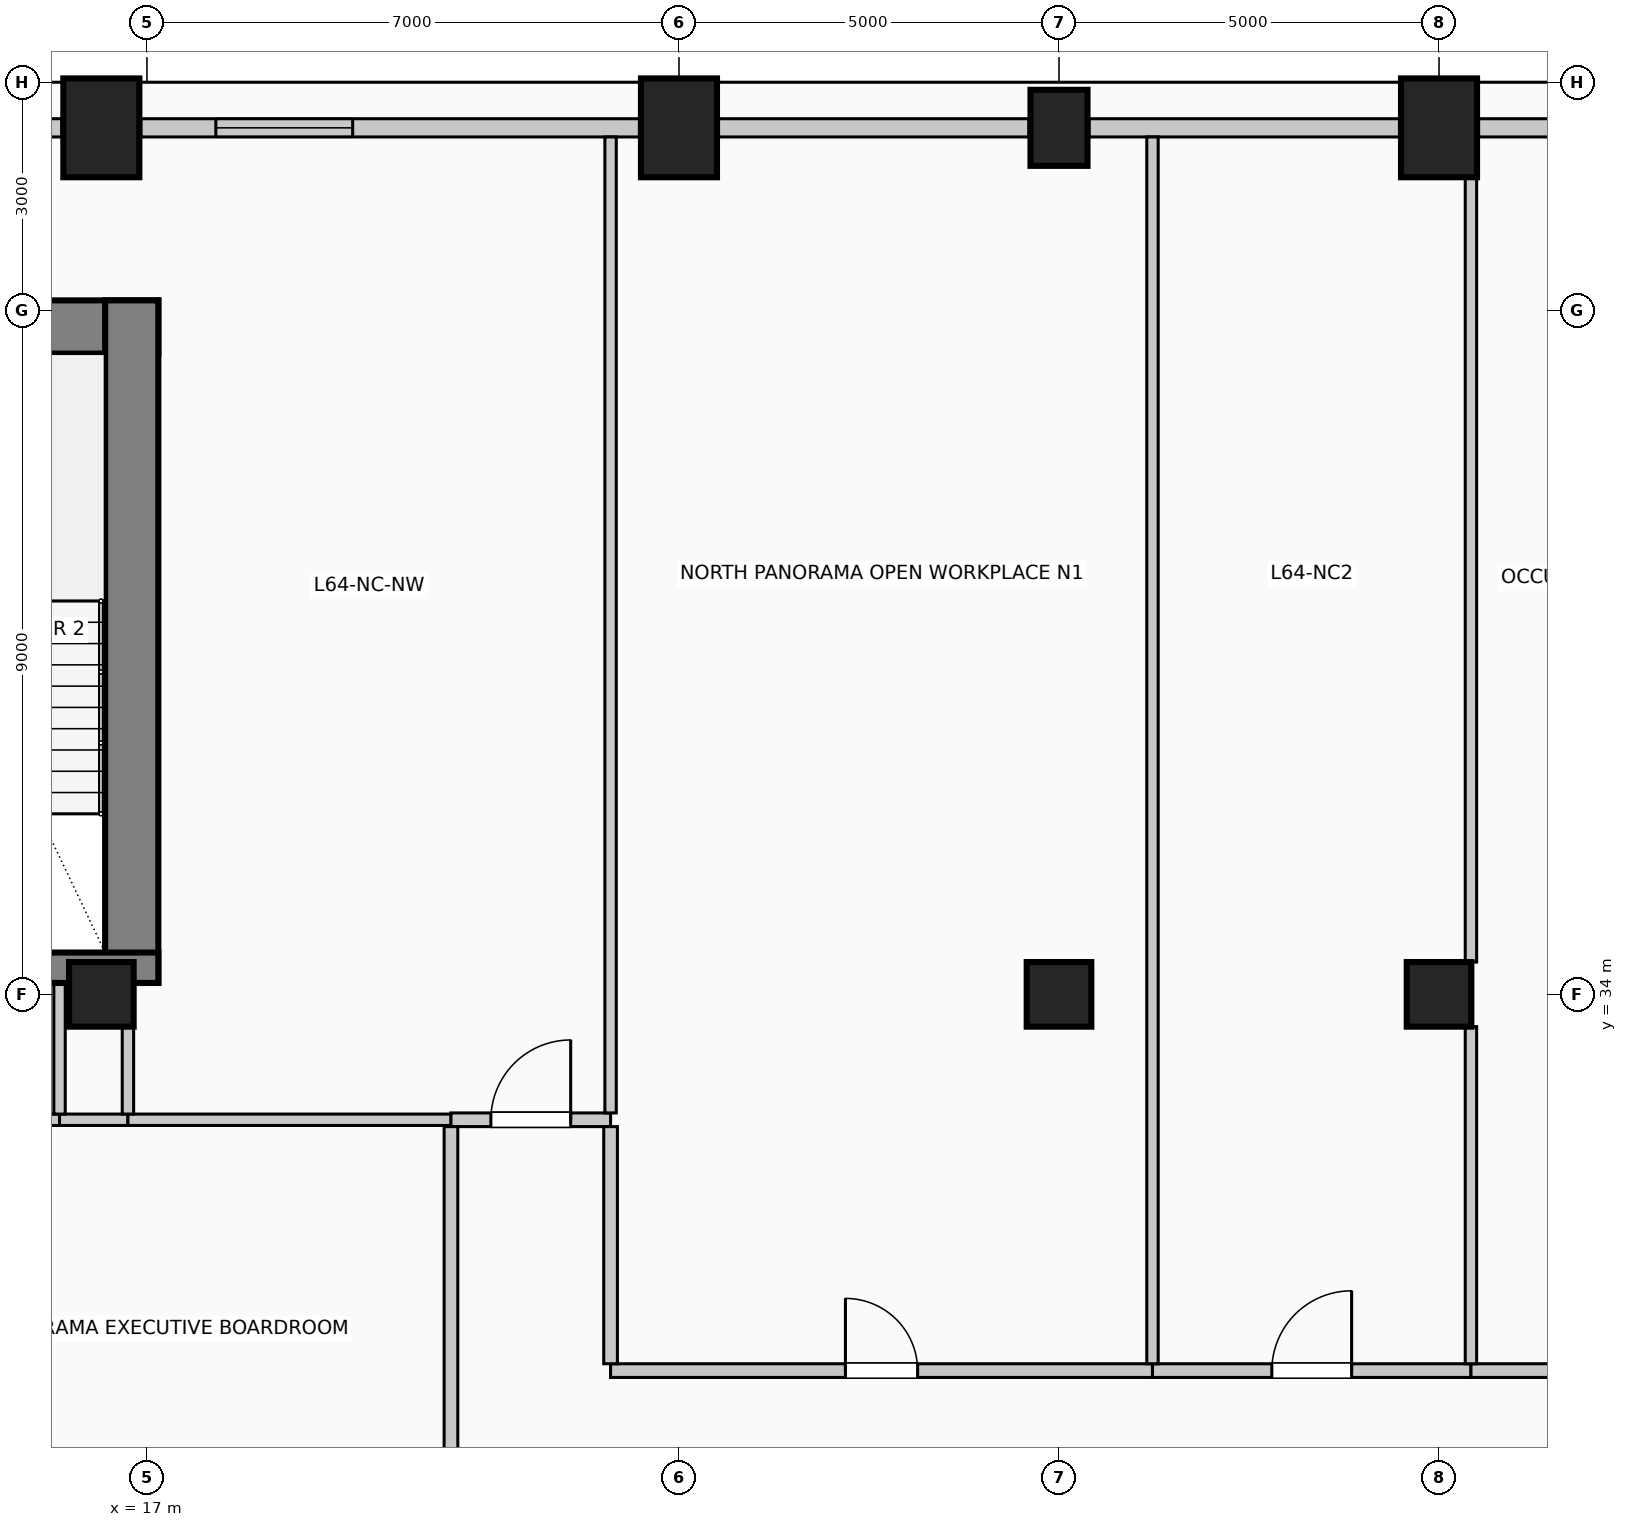
"""IFC4 building model, lengths in metres.
Left out: names, types, materials, properties, quantities, classifications, styles, units other than length and angle.
Written with IfcOpenShell. Run it as: python <this file> out.ifc"""

import sys

from ifc_helpers import new_model, si_unit, direction, frame, frame_2d, origin, origin_2d, place, context, subcontext, project, spatial, rectangle, circle, extrude, element, fill, save


model = new_model("IFC4")
c1 = context("Model", 3, precision=1e-05, world=origin(), true_north=direction((0.0, 1.0)))
c2 = subcontext(c1, "Body", "Model", "MODEL_VIEW")
j1 = project(units=[si_unit("LENGTHUNIT", "METRE"), si_unit("PLANEANGLEUNIT", "RADIAN")], contexts=[c1])
p1 = place(None, origin())
s1 = spatial("IfcSite", under=j1, at=p1, CompositionType="ELEMENT")
p2 = place(p1, origin())
s2 = spatial("IfcBuilding", under=s1, at=p2, CompositionType="ELEMENT")
p3 = place(p2, frame((0.0, 0.0, 264.6)))
s3 = spatial("IfcBuildingStorey", under=s2, at=p3, CompositionType="ELEMENT", Elevation=264.6)
p4 = place(p3, frame((2.85, 42.78, 0.0), z_axis=(0.0, 0.0, 1.0), x_axis=(1.0, 0.0, 0.0)))
e1 = element("IfcWall", 1, at=p4, inside=s3, PredefinedType="SHEAR", context=c2, shape_type="SweptSolid", body=[
    extrude(rectangle(XDim=14.3, YDim=0.7, at=frame_2d((7.15, 0.0))), origin(), (0.0, 0.0, 1.0), 4.0),
])
p5 = place(p3, frame((16.8, 34.15, 0.0), z_axis=(0.0, 0.0, 1.0), x_axis=(0.0, 1.0, 0.0)))
e2 = element("IfcWall", 2, at=p5, inside=s3, PredefinedType="SHEAR", context=c2, shape_type="SweptSolid", body=[
    extrude(rectangle(XDim=8.98, YDim=0.7, at=frame_2d((4.49, 0.0))), origin(), (0.0, 0.0, 1.0), 4.0),
])
p6 = place(p3, frame((12.29, 34.35, 0.0), z_axis=(0.0, 0.0, 1.0), x_axis=(1.0, 0.0, 0.0)))
e3 = element("IfcWall", 3, at=p6, inside=s3, PredefinedType="SHEAR", context=c2, shape_type="SweptSolid", body=[
    extrude(rectangle(XDim=4.86, YDim=0.4, at=frame_2d((2.43, 0.0))), origin(), (0.0, 0.0, 1.0), 4.0),
])
p7 = place(p6, frame((1.4, 0.0, 0.0)))
e4 = element("IfcOpeningElement", 4, at=p7, cuts=e3, PredefinedType="OPENING", context=c2, shape_type="SweptSolid", body=[
    extrude(rectangle(XDim=1.15, YDim=2.2, at=frame_2d((0.575, 1.1))), frame((0.0, 0.21, 0.0), z_axis=(0.0, -1.0, 0.0), x_axis=(1.0, 0.0, 0.0)), (0.0, 0.0, 1.0), 0.42),
])
for number, where, z_axis, x_axis in (
    (5, (16.4, 45.4, 0.0), (0.0, 0.0, 1.0), (1.0, 0.0, 0.0)),
    (6, (24.0, 45.4, 0.0), (0.0, 0.0, 1.0), (1.0, 0.0, 0.0)),
):
    element("IfcColumn", number, at=place(p3, frame(where, z_axis=z_axis, x_axis=x_axis)), inside=s3, PredefinedType="COLUMN", context=c2, shape_type="SweptSolid", body=[
        extrude(rectangle(XDim=1.0, YDim=1.3, at=origin_2d()), origin(), (0.0, 0.0, 1.0), 4.0),
    ])
p8 = place(p3, frame((29.0, 45.4, 0.0), z_axis=(0.0, 0.0, 1.0), x_axis=(1.0, 0.0, 0.0)))
e7 = element("IfcColumn", 7, at=p8, inside=s3, PredefinedType="COLUMN", context=c2, shape_type="SweptSolid", body=[
    extrude(rectangle(XDim=0.75, YDim=1.0, at=origin_2d()), origin(), (0.0, 0.0, 1.0), 4.0),
])
p9 = place(p3, frame((34.0, 45.4, 0.0), z_axis=(0.0, 0.0, 1.0), x_axis=(1.0, 0.0, 0.0)))
e8 = element("IfcColumn", 8, at=p9, inside=s3, PredefinedType="COLUMN", context=c2, shape_type="SweptSolid", body=[
    extrude(rectangle(XDim=1.0, YDim=1.3, at=origin_2d()), origin(), (0.0, 0.0, 1.0), 4.0),
])
for number, where, z_axis, x_axis in (
    (9, (16.4, 34.0, 0.0), (0.0, 0.0, 1.0), (1.0, 0.0, 0.0)),
    (10, (29.0, 34.0, 0.0), (0.0, 0.0, 1.0), (1.0, 0.0, 0.0)),
    (11, (34.0, 34.0, 0.0), (0.0, 0.0, 1.0), (1.0, 0.0, 0.0)),
):
    element("IfcColumn", number, at=place(p3, frame(where, z_axis=z_axis, x_axis=x_axis)), inside=s3, PredefinedType="COLUMN", context=c2, shape_type="SweptSolid", body=[
        extrude(circle(Radius=0.425, at=origin_2d()), origin(), (0.0, 0.0, 1.0), 4.0),
    ])
p10 = place(p3, frame((14.395, 45.4, 0.0), z_axis=(0.0, 0.0, 1.0), x_axis=(1.0, 0.0, 0.0)))
e12 = element("IfcWall", 12, at=p10, inside=s3, PredefinedType="SOLIDWALL", context=c2, shape_type="SweptSolid", body=[
    extrude(rectangle(XDim=1.485, YDim=0.24, at=frame_2d((0.742, 0.0))), origin(), (0.0, 0.0, 1.0), 3.0),
])
p11 = place(p3, frame((16.92, 45.4, 0.0), z_axis=(0.0, 0.0, 1.0), x_axis=(1.0, 0.0, 0.0)))
e13 = element("IfcWall", 13, at=p11, inside=s3, PredefinedType="SOLIDWALL", context=c2, shape_type="SweptSolid", body=[
    extrude(rectangle(XDim=6.56, YDim=0.24, at=frame_2d((3.28, 0.0))), origin(), (0.0, 0.0, 1.0), 3.0),
])
p12 = place(p11, frame((0.987, 0.0, 0.42)))
e14 = element("IfcOpeningElement", 14, at=p12, cuts=e13, PredefinedType="OPENING", context=c2, shape_type="SweptSolid", body=[
    extrude(rectangle(XDim=1.8, YDim=2.2, at=frame_2d((0.9, 1.1))), frame((0.0, 0.13, 0.0), z_axis=(0.0, -1.0, 0.0), x_axis=(1.0, 0.0, 0.0)), (0.0, 0.0, 1.0), 0.26),
])
for number, where, z_axis, x_axis in (
    (15, (24.52, 45.4, 0.0), (0.0, 0.0, 1.0), (1.0, 0.0, 0.0)),
    (16, (29.395, 45.4, 0.0), (0.0, 0.0, 1.0), (1.0, 0.0, 0.0)),
):
    element("IfcWall", number, at=place(p3, frame(where, z_axis=z_axis, x_axis=x_axis)), inside=s3, PredefinedType="SOLIDWALL", context=c2, shape_type="SweptSolid", body=[
        extrude(rectangle(XDim=4.085, YDim=0.24, at=frame_2d((2.042, 0.0))), origin(), (0.0, 0.0, 1.0), 3.0),
    ])
p13 = place(p3, frame((34.52, 45.4, 0.0), z_axis=(0.0, 0.0, 1.0), x_axis=(1.0, 0.0, 0.0)))
e17 = element("IfcWall", 17, at=p13, inside=s3, PredefinedType="SOLIDWALL", context=c2, shape_type="SweptSolid", body=[
    extrude(rectangle(XDim=6.56, YDim=0.24, at=frame_2d((3.28, 0.0))), origin(), (0.0, 0.0, 1.0), 3.0),
])
p14 = place(p13, frame((0.987, 0.0, 0.42)))
e18 = element("IfcOpeningElement", 18, at=p14, cuts=e17, PredefinedType="OPENING", context=c2, shape_type="SweptSolid", body=[
    extrude(rectangle(XDim=1.8, YDim=2.2, at=frame_2d((0.9, 1.1))), frame((0.0, 0.13, 0.0), z_axis=(0.0, -1.0, 0.0), x_axis=(1.0, 0.0, 0.0)), (0.0, 0.0, 1.0), 0.26),
])
p15 = place(p3, frame((23.1, 29.05, 0.0), z_axis=(0.0, 0.0, 1.0), x_axis=(1.0, 0.0, 0.0)))
e19 = element("IfcWall", 19, at=p15, inside=s3, PredefinedType="PARTITIONING", context=c2, shape_type="SweptSolid", body=[
    extrude(rectangle(XDim=7.13, YDim=0.18, at=frame_2d((3.565, 0.0))), origin(), (0.0, 0.0, 1.0), 3.75),
])
p16 = place(p15, frame((3.09, 0.0, 0.0)))
e20 = element("IfcOpeningElement", 20, at=p16, cuts=e19, PredefinedType="OPENING", context=c2, shape_type="SweptSolid", body=[
    extrude(rectangle(XDim=0.95, YDim=2.15, at=frame_2d((0.475, 1.075))), frame((0.0, 0.1, 0.0), z_axis=(0.0, -1.0, 0.0), x_axis=(1.0, 0.0, 0.0)), (0.0, 0.0, 1.0), 0.2),
])
p17 = place(p3, frame((30.23, 29.05, 0.0), z_axis=(0.0, 0.0, 1.0), x_axis=(1.0, 0.0, 0.0)))
e21 = element("IfcWall", 21, at=p17, inside=s3, PredefinedType="PARTITIONING", context=c2, shape_type="SweptSolid", body=[
    extrude(rectangle(XDim=4.19, YDim=0.18, at=frame_2d((2.095, 0.0))), origin(), (0.0, 0.0, 1.0), 3.75),
])
p18 = place(p17, frame((1.57, 0.0, 0.0)))
e22 = element("IfcOpeningElement", 22, at=p18, cuts=e21, PredefinedType="OPENING", context=c2, shape_type="SweptSolid", body=[
    extrude(rectangle(XDim=1.05, YDim=2.15, at=frame_2d((0.525, 1.075))), frame((0.0, 0.1, 0.0), z_axis=(0.0, -1.0, 0.0), x_axis=(1.0, 0.0, 0.0)), (0.0, 0.0, 1.0), 0.2),
])
p19 = place(p3, frame((34.42, 29.05, 0.0), z_axis=(0.0, 0.0, 1.0), x_axis=(1.0, 0.0, 0.0)))
e23 = element("IfcWall", 23, at=p19, inside=s3, PredefinedType="PARTITIONING", context=c2, shape_type="SweptSolid", body=[
    extrude(rectangle(XDim=7.13, YDim=0.18, at=frame_2d((3.565, 0.0))), origin(), (0.0, 0.0, 1.0), 3.75),
])
p20 = place(p19, frame((3.09, 0.0, 0.0)))
e24 = element("IfcOpeningElement", 24, at=p20, cuts=e23, PredefinedType="OPENING", context=c2, shape_type="SweptSolid", body=[
    extrude(rectangle(XDim=0.95, YDim=2.15, at=frame_2d((0.475, 1.075))), frame((0.0, 0.1, 0.0), z_axis=(0.0, -1.0, 0.0), x_axis=(1.0, 0.0, 0.0)), (0.0, 0.0, 1.0), 0.2),
])
p21 = place(p3, frame((12.33, 32.35, 0.0), z_axis=(0.0, 0.0, 1.0), x_axis=(1.0, 0.0, 0.0)))
e25 = element("IfcWall", 25, at=p21, inside=s3, PredefinedType="PARTITIONING", context=c2, shape_type="SweptSolid", body=[
    extrude(rectangle(XDim=3.52, YDim=0.15, at=frame_2d((1.76, 0.0))), origin(), (0.0, 0.0, 1.0), 3.75),
])
p22 = place(p21, frame((1.285, 0.0, 0.0)))
e26 = element("IfcOpeningElement", 26, at=p22, cuts=e25, PredefinedType="OPENING", context=c2, shape_type="SweptSolid", body=[
    extrude(rectangle(XDim=0.95, YDim=2.15, at=frame_2d((0.475, 1.075))), frame((0.0, 0.085, 0.0), z_axis=(0.0, -1.0, 0.0), x_axis=(1.0, 0.0, 0.0)), (0.0, 0.0, 1.0), 0.17),
])
p23 = place(p3, frame((15.85, 32.35, 0.0), z_axis=(0.0, 0.0, 1.0), x_axis=(1.0, 0.0, 0.0)))
e27 = element("IfcWall", 27, at=p23, inside=s3, PredefinedType="PARTITIONING", context=c2, shape_type="SweptSolid", body=[
    extrude(rectangle(XDim=0.9, YDim=0.15, at=frame_2d((0.45, 0.0))), origin(), (0.0, 0.0, 1.0), 3.75),
])
p24 = place(p3, frame((16.75, 32.35, 0.0), z_axis=(0.0, 0.0, 1.0), x_axis=(1.0, 0.0, 0.0)))
e28 = element("IfcWall", 28, at=p24, inside=s3, PredefinedType="PARTITIONING", context=c2, shape_type="SweptSolid", body=[
    extrude(rectangle(XDim=4.25, YDim=0.15, at=frame_2d((2.125, 0.0))), origin(), (0.0, 0.0, 1.0), 3.75),
])
p25 = place(p3, frame((21.0, 32.35, 0.0), z_axis=(0.0, 0.0, 1.0), x_axis=(1.0, 0.0, 0.0)))
e29 = element("IfcWall", 29, at=p25, inside=s3, PredefinedType="PARTITIONING", context=c2, shape_type="SweptSolid", body=[
    extrude(rectangle(XDim=2.1, YDim=0.18, at=frame_2d((1.05, 0.0))), origin(), (0.0, 0.0, 1.0), 3.75),
])
p26 = place(p25, frame((0.525, 0.0, 0.0)))
e30 = element("IfcOpeningElement", 30, at=p26, cuts=e29, PredefinedType="OPENING", context=c2, shape_type="SweptSolid", body=[
    extrude(rectangle(XDim=1.05, YDim=2.15, at=frame_2d((0.525, 1.075))), frame((0.0, 0.1, 0.0), z_axis=(0.0, -1.0, 0.0), x_axis=(1.0, 0.0, 0.0)), (0.0, 0.0, 1.0), 0.2),
])
p27 = place(p3, frame((15.85, 32.425, 0.0), z_axis=(0.0, 0.0, 1.0), x_axis=(0.0, 1.0, 0.0)))
e31 = element("IfcWall", 31, at=p27, inside=s3, PredefinedType="PARTITIONING", context=c2, shape_type="SweptSolid", body=[
    extrude(rectangle(XDim=1.725, YDim=0.15, at=frame_2d((0.862, 0.0))), origin(), (0.0, 0.0, 1.0), 3.75),
])
p28 = place(p3, frame((16.75, 32.425, 0.0), z_axis=(0.0, 0.0, 1.0), x_axis=(0.0, 1.0, 0.0)))
e32 = element("IfcWall", 32, at=p28, inside=s3, PredefinedType="PARTITIONING", context=c2, shape_type="SweptSolid", body=[
    extrude(rectangle(XDim=1.15, YDim=0.15, at=frame_2d((0.575, 0.0))), origin(), (0.0, 0.0, 1.0), 3.75),
])
p29 = place(p3, frame((21.0, 26.925, 0.0), z_axis=(0.0, 0.0, 1.0), x_axis=(0.0, 1.0, 0.0)))
e33 = element("IfcWall", 33, at=p29, inside=s3, PredefinedType="PARTITIONING", context=c2, shape_type="SweptSolid", body=[
    extrude(rectangle(XDim=5.335, YDim=0.18, at=frame_2d((2.667, 0.0))), origin(), (0.0, 0.0, 1.0), 3.75),
])
p30 = place(p3, frame((23.1, 29.14, 0.0), z_axis=(0.0, 0.0, 1.0), x_axis=(0.0, 1.0, 0.0)))
e34 = element("IfcWall", 34, at=p30, inside=s3, PredefinedType="PARTITIONING", context=c2, shape_type="SweptSolid", body=[
    extrude(rectangle(XDim=3.12, YDim=0.18, at=frame_2d((1.56, 0.0))), origin(), (0.0, 0.0, 1.0), 3.75),
])
p31 = place(p3, frame((23.1, 32.44, 0.0), z_axis=(0.0, 0.0, 1.0), x_axis=(0.0, 1.0, 0.0)))
e35 = element("IfcWall", 35, at=p31, inside=s3, PredefinedType="PARTITIONING", context=c2, shape_type="SweptSolid", body=[
    extrude(rectangle(XDim=12.84, YDim=0.15, at=frame_2d((6.42, 0.0))), origin(), (0.0, 0.0, 1.0), 3.75),
])
p32 = place(p3, frame((30.23, 29.14, 0.0), z_axis=(0.0, 0.0, 1.0), x_axis=(0.0, 1.0, 0.0)))
e36 = element("IfcWall", 36, at=p32, inside=s3, PredefinedType="PARTITIONING", context=c2, shape_type="SweptSolid", body=[
    extrude(rectangle(XDim=16.14, YDim=0.15, at=frame_2d((8.07, 0.0))), origin(), (0.0, 0.0, 1.0), 3.75),
])
p33 = place(p3, frame((34.42, 29.14, 0.0), z_axis=(0.0, 0.0, 1.0), x_axis=(0.0, 1.0, 0.0)))
e37 = element("IfcWall", 37, at=p33, inside=s3, PredefinedType="PARTITIONING", context=c2, shape_type="SweptSolid", body=[
    extrude(rectangle(XDim=4.435, YDim=0.15, at=frame_2d((2.218, 0.0))), origin(), (0.0, 0.0, 1.0), 3.75),
])
p34 = place(p3, frame((34.42, 34.425, 0.0), z_axis=(0.0, 0.0, 1.0), x_axis=(0.0, 1.0, 0.0)))
e38 = element("IfcWall", 38, at=p34, inside=s3, PredefinedType="PARTITIONING", context=c2, shape_type="SweptSolid", body=[
    extrude(rectangle(XDim=10.325, YDim=0.15, at=frame_2d((5.163, 0.0))), origin(), (0.0, 0.0, 1.0), 3.75),
])
p35 = place(p12, origin())
e39 = element("IfcWindow", 39, at=p35, inside=s3, PartitioningType="SINGLE_PANEL", PredefinedType="WINDOW", context=c2, shape_type="SweptSolid", body=[
    extrude(rectangle(XDim=1.8, YDim=2.2, at=frame_2d((0.9, 1.1))), frame((0.0, 0.03, 0.0), z_axis=(0.0, -1.0, 0.0), x_axis=(1.0, 0.0, 0.0)), (0.0, 0.0, 1.0), 0.06),
])
fill(e14, e39)
p36 = place(p16, origin())
e40 = element("IfcDoor", 40, at=p36, inside=s3, OperationType="SINGLE_SWING_LEFT", PredefinedType="DOOR", context=c2, shape_type="SweptSolid", body=[
    extrude(rectangle(XDim=0.95, YDim=2.15, at=frame_2d((0.475, 1.075))), frame((0.0, 0.025, 0.0), z_axis=(0.0, -1.0, 0.0), x_axis=(1.0, 0.0, 0.0)), (0.0, 0.0, 1.0), 0.05),
])
fill(e20, e40)
p37 = place(p18, origin())
e41 = element("IfcDoor", 41, at=p37, inside=s3, OperationType="SINGLE_SWING_RIGHT", PredefinedType="DOOR", context=c2, shape_type="SweptSolid", body=[
    extrude(rectangle(XDim=1.05, YDim=2.15, at=frame_2d((0.525, 1.075))), frame((0.0, 0.025, 0.0), z_axis=(0.0, -1.0, 0.0), x_axis=(1.0, 0.0, 0.0)), (0.0, 0.0, 1.0), 0.05),
])
fill(e22, e41)
p38 = place(p26, origin())
e42 = element("IfcDoor", 42, at=p38, inside=s3, OperationType="SINGLE_SWING_RIGHT", PredefinedType="DOOR", context=c2, shape_type="SweptSolid", body=[
    extrude(rectangle(XDim=1.05, YDim=2.15, at=frame_2d((0.525, 1.075))), frame((0.0, 0.025, 0.0), z_axis=(0.0, -1.0, 0.0), x_axis=(1.0, 0.0, 0.0)), (0.0, 0.0, 1.0), 0.05),
])
fill(e30, e42)
save(model, sys.argv[1])
